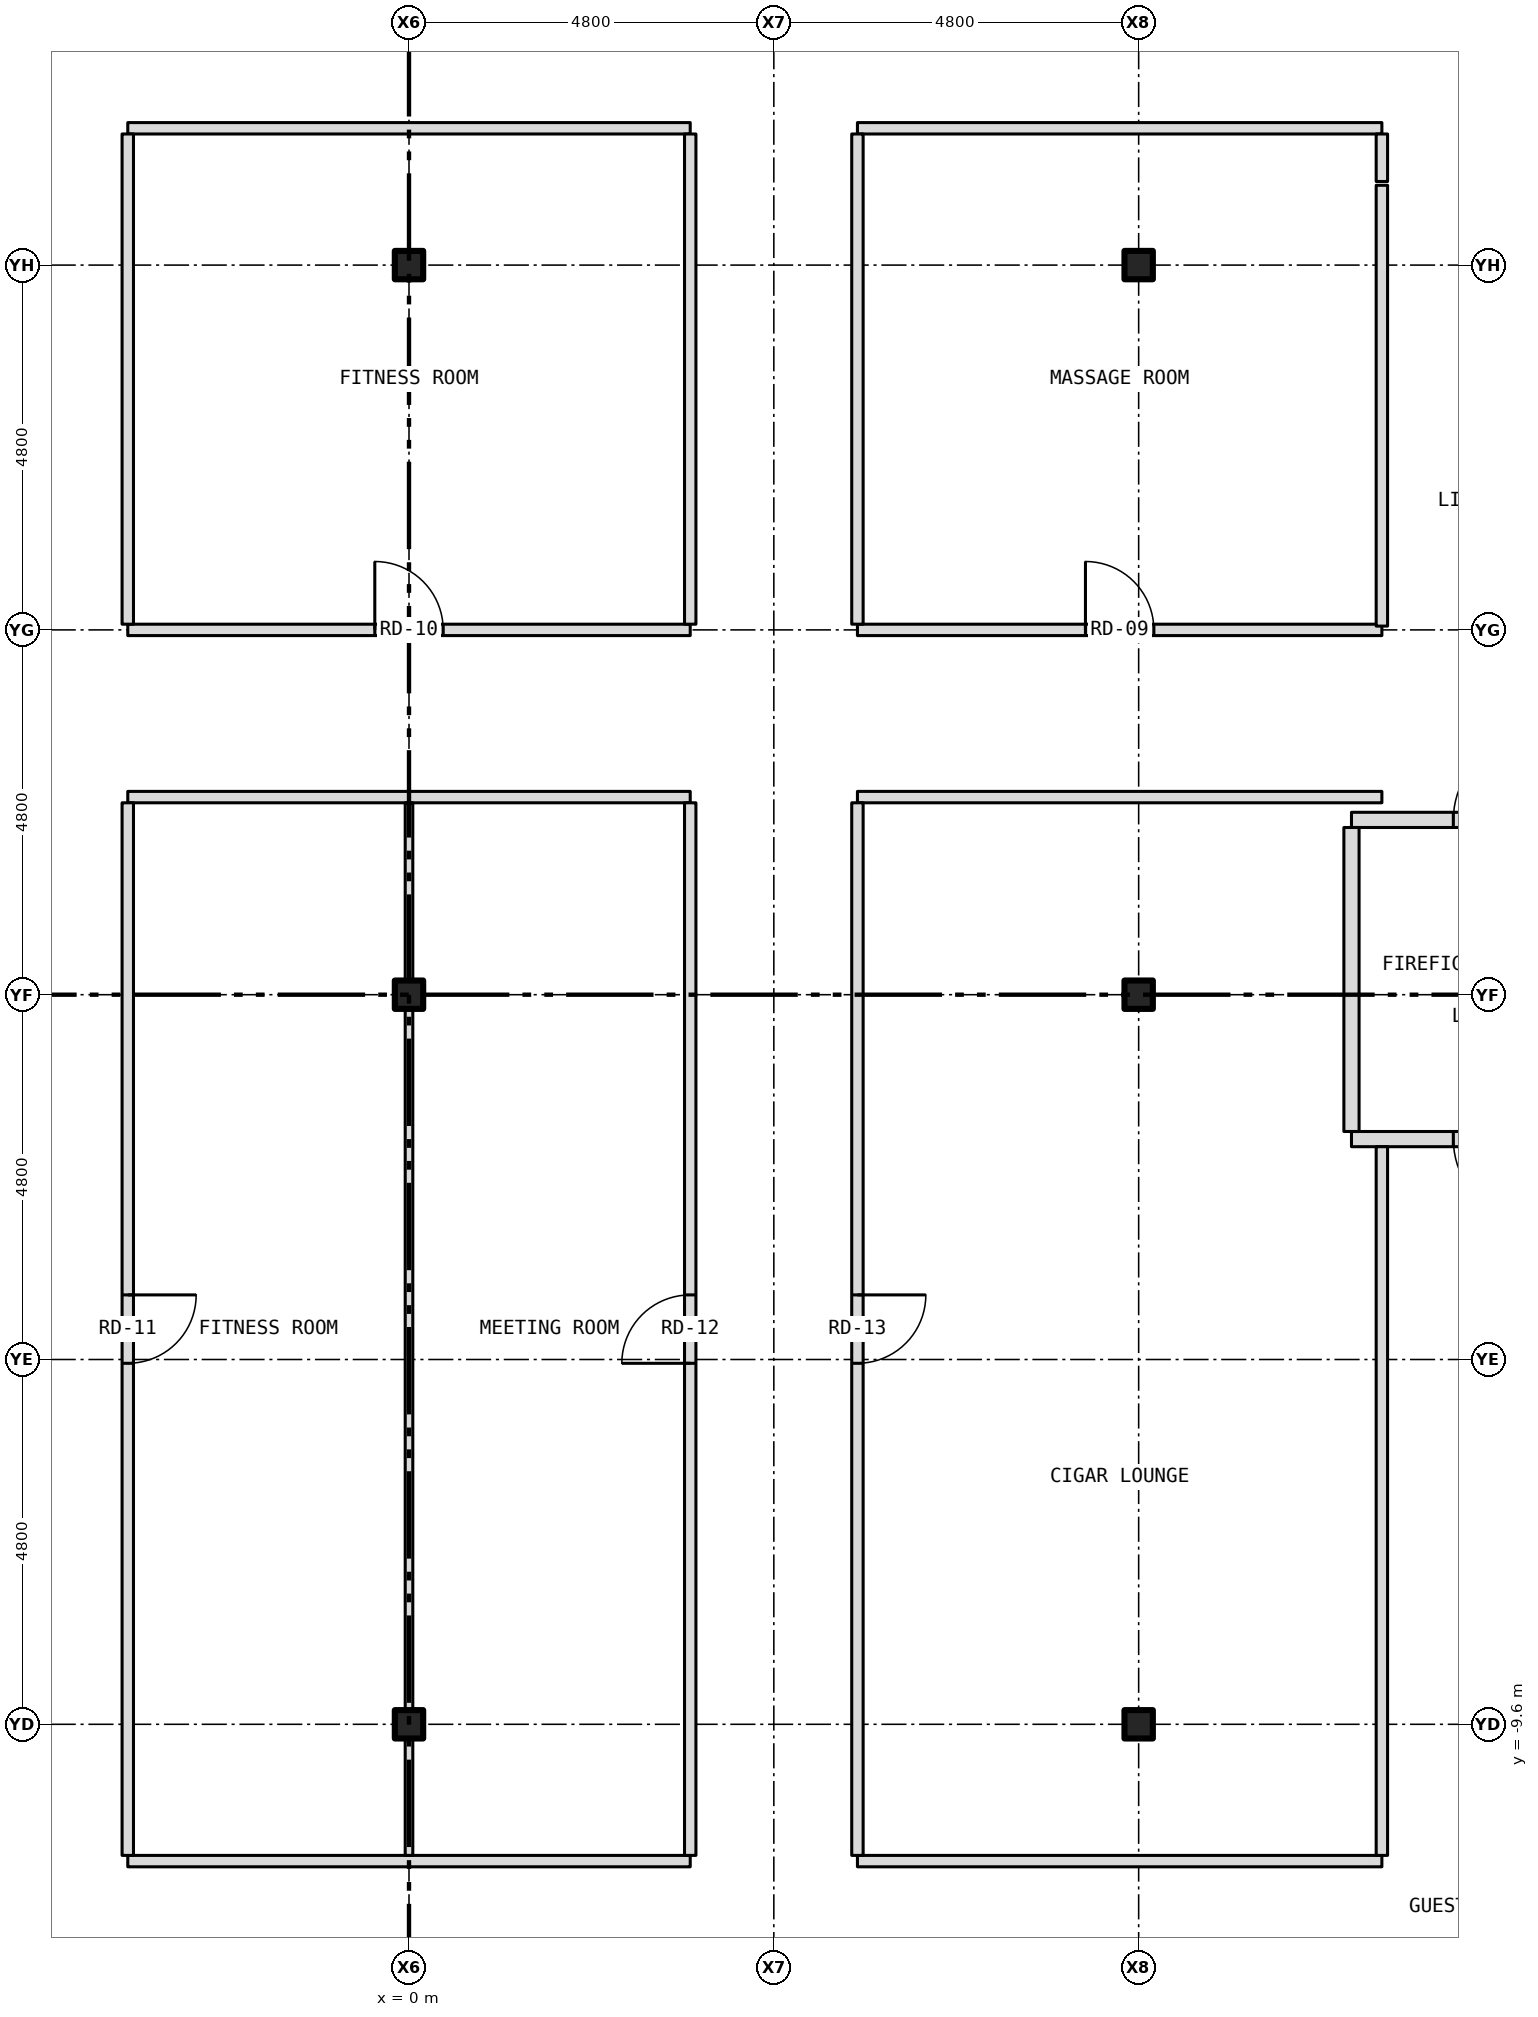
"""IFC4 building model, lengths in metres.
Left out: names, types, materials, properties, quantities, classifications, styles, units other than length and angle.
Written with IfcOpenShell. Run it as: python <this file> out.ifc"""

import sys

from ifc_helpers import new_model, si_unit, direction, frame, frame_2d, origin, origin_2d, place, context, subcontext, project, spatial, rectangle, i_section, extrude, element, fill, save


model = new_model("IFC4")
c1 = context("Model", 3, precision=1e-05, world=origin(), true_north=direction((0.0, 1.0)))
c2 = subcontext(c1, "Body", "Model", "MODEL_VIEW")
j1 = project(units=[si_unit("LENGTHUNIT", "METRE"), si_unit("PLANEANGLEUNIT", "RADIAN")], contexts=[c1])
p1 = place(None, origin())
s1 = spatial("IfcSite", under=j1, at=p1, CompositionType="ELEMENT")
p2 = place(p1, origin())
s2 = spatial("IfcBuilding", under=s1, at=p2, CompositionType="ELEMENT")
p3 = place(p2, frame((0.0, 0.0, 148.0)))
s3 = spatial("IfcBuildingStorey", under=s2, at=p3, CompositionType="ELEMENT", Elevation=148.0)
for number, where, z_axis, x_axis in (
    (1, (0.0, -9.6, -0.15), (0.0, 0.0, 1.0), (1.0, 0.0, 0.0)),
    (2, (0.0, 0.0, -0.15), (0.0, 0.0, 1.0), (1.0, 0.0, 0.0)),
    (3, (0.0, 9.6, -0.15), (0.0, 0.0, 1.0), (1.0, 0.0, 0.0)),
    (4, (9.6, -9.6, -0.15), (0.0, 0.0, 1.0), (1.0, 0.0, 0.0)),
    (5, (9.6, 0.0, -0.15), (0.0, 0.0, 1.0), (1.0, 0.0, 0.0)),
    (6, (9.6, 9.6, -0.15), (0.0, 0.0, 1.0), (1.0, 0.0, 0.0)),
):
    element("IfcColumn", number, at=place(p3, frame(where, z_axis=z_axis, x_axis=x_axis)), inside=s3, PredefinedType="COLUMN", context=c2, shape_type="SweptSolid", body=[
        extrude(i_section(OverallWidth=0.373, OverallDepth=0.373, WebThickness=0.016, FlangeThickness=0.026, at=origin_2d()), origin(), (0.0, 0.0, 1.0), 3.5),
    ])
p4 = place(p3, frame((-3.7, -11.4, 0.0), z_axis=(0.0, 0.0, 1.0), x_axis=(1.0, 0.0, 0.0)))
e7 = element("IfcWall", 7, at=p4, inside=s3, PredefinedType="PARTITIONING", context=c2, shape_type="SweptSolid", body=[
    extrude(rectangle(XDim=7.4, YDim=0.15, at=frame_2d((3.7, 0.0))), origin(), (0.0, 0.0, 1.0), 3.35),
])
p5 = place(p3, frame((5.9, -11.4, 0.0), z_axis=(0.0, 0.0, 1.0), x_axis=(1.0, 0.0, 0.0)))
e8 = element("IfcWall", 8, at=p5, inside=s3, PredefinedType="PARTITIONING", context=c2, shape_type="SweptSolid", body=[
    extrude(rectangle(XDim=6.9, YDim=0.15, at=frame_2d((3.45, 0.0))), origin(), (0.0, 0.0, 1.0), 3.35),
])
p6 = place(p3, frame((12.4, -1.9, 0.0), z_axis=(0.0, 0.0, 1.0), x_axis=(1.0, 0.0, 0.0)))
e9 = element("IfcWall", 9, at=p6, inside=s3, PredefinedType="PARTITIONING", context=c2, shape_type="SweptSolid", body=[
    extrude(rectangle(XDim=3.28, YDim=0.2, at=frame_2d((1.64, 0.0))), origin(), (0.0, 0.0, 1.0), 3.35),
])
p7 = place(p6, frame((1.34, 0.0, 0.0)))
e10 = element("IfcOpeningElement", 10, at=p7, cuts=e9, PredefinedType="OPENING", context=c2, shape_type="SweptSolid", body=[
    extrude(rectangle(XDim=1.1, YDim=2.1, at=frame_2d((0.55, 1.05))), frame((0.0, 0.112, 0.0), z_axis=(0.0, -1.0, 0.0), x_axis=(1.0, 0.0, 0.0)), (0.0, 0.0, 1.0), 0.224),
])
p8 = place(p3, frame((12.4, 2.3, 0.0), z_axis=(0.0, 0.0, 1.0), x_axis=(1.0, 0.0, 0.0)))
e11 = element("IfcWall", 11, at=p8, inside=s3, PredefinedType="PARTITIONING", context=c2, shape_type="SweptSolid", body=[
    extrude(rectangle(XDim=3.28, YDim=0.2, at=frame_2d((1.64, 0.0))), origin(), (0.0, 0.0, 1.0), 3.35),
])
p9 = place(p8, frame((1.34, 0.0, 0.0)))
e12 = element("IfcOpeningElement", 12, at=p9, cuts=e11, PredefinedType="OPENING", context=c2, shape_type="SweptSolid", body=[
    extrude(rectangle(XDim=1.1, YDim=2.1, at=frame_2d((0.55, 1.05))), frame((0.0, 0.112, 0.0), z_axis=(0.0, -1.0, 0.0), x_axis=(1.0, 0.0, 0.0)), (0.0, 0.0, 1.0), 0.224),
])
p10 = place(p3, frame((-3.7, 2.6, 0.0), z_axis=(0.0, 0.0, 1.0), x_axis=(1.0, 0.0, 0.0)))
e13 = element("IfcWall", 13, at=p10, inside=s3, PredefinedType="PARTITIONING", context=c2, shape_type="SweptSolid", body=[
    extrude(rectangle(XDim=7.4, YDim=0.15, at=frame_2d((3.7, 0.0))), origin(), (0.0, 0.0, 1.0), 3.35),
])
p11 = place(p3, frame((5.9, 2.6, 0.0), z_axis=(0.0, 0.0, 1.0), x_axis=(1.0, 0.0, 0.0)))
e14 = element("IfcWall", 14, at=p11, inside=s3, PredefinedType="PARTITIONING", context=c2, shape_type="SweptSolid", body=[
    extrude(rectangle(XDim=6.9, YDim=0.15, at=frame_2d((3.45, 0.0))), origin(), (0.0, 0.0, 1.0), 3.35),
])
p12 = place(p3, frame((-3.7, 4.8, 0.0), z_axis=(0.0, 0.0, 1.0), x_axis=(1.0, 0.0, 0.0)))
e15 = element("IfcWall", 15, at=p12, inside=s3, PredefinedType="PARTITIONING", context=c2, shape_type="SweptSolid", body=[
    extrude(rectangle(XDim=7.4, YDim=0.15, at=frame_2d((3.7, 0.0))), origin(), (0.0, 0.0, 1.0), 3.35),
])
p13 = place(p12, frame((3.25, 0.0, 0.0)))
e16 = element("IfcOpeningElement", 16, at=p13, cuts=e15, PredefinedType="OPENING", context=c2, shape_type="SweptSolid", body=[
    extrude(rectangle(XDim=0.9, YDim=2.1, at=frame_2d((0.45, 1.05))), frame((0.0, 0.087, 0.0), z_axis=(0.0, -1.0, 0.0), x_axis=(1.0, 0.0, 0.0)), (0.0, 0.0, 1.0), 0.174),
])
p14 = place(p3, frame((5.9, 4.8, 0.0), z_axis=(0.0, 0.0, 1.0), x_axis=(1.0, 0.0, 0.0)))
e17 = element("IfcWall", 17, at=p14, inside=s3, PredefinedType="PARTITIONING", context=c2, shape_type="SweptSolid", body=[
    extrude(rectangle(XDim=6.9, YDim=0.15, at=frame_2d((3.45, 0.0))), origin(), (0.0, 0.0, 1.0), 3.35),
])
p15 = place(p14, frame((3.0, 0.0, 0.0)))
e18 = element("IfcOpeningElement", 18, at=p15, cuts=e17, PredefinedType="OPENING", context=c2, shape_type="SweptSolid", body=[
    extrude(rectangle(XDim=0.9, YDim=2.1, at=frame_2d((0.45, 1.05))), frame((0.0, 0.087, 0.0), z_axis=(0.0, -1.0, 0.0), x_axis=(1.0, 0.0, 0.0)), (0.0, 0.0, 1.0), 0.174),
])
p16 = place(p3, frame((-3.7, 11.4, 0.0), z_axis=(0.0, 0.0, 1.0), x_axis=(1.0, 0.0, 0.0)))
e19 = element("IfcWall", 19, at=p16, inside=s3, PredefinedType="PARTITIONING", context=c2, shape_type="SweptSolid", body=[
    extrude(rectangle(XDim=7.4, YDim=0.15, at=frame_2d((3.7, 0.0))), origin(), (0.0, 0.0, 1.0), 3.35),
])
p17 = place(p3, frame((5.9, 11.4, 0.0), z_axis=(0.0, 0.0, 1.0), x_axis=(1.0, 0.0, 0.0)))
e20 = element("IfcWall", 20, at=p17, inside=s3, PredefinedType="PARTITIONING", context=c2, shape_type="SweptSolid", body=[
    extrude(rectangle(XDim=6.9, YDim=0.15, at=frame_2d((3.45, 0.0))), origin(), (0.0, 0.0, 1.0), 3.35),
])
p18 = place(p3, frame((-3.7, -11.325, 0.0), z_axis=(0.0, 0.0, 1.0), x_axis=(0.0, 1.0, 0.0)))
e21 = element("IfcWall", 21, at=p18, inside=s3, PredefinedType="PARTITIONING", context=c2, shape_type="SweptSolid", body=[
    extrude(rectangle(XDim=13.85, YDim=0.15, at=frame_2d((6.925, 0.0))), origin(), (0.0, 0.0, 1.0), 3.35),
])
p19 = place(p18, frame((6.475, 0.0, 0.0)))
e22 = element("IfcOpeningElement", 22, at=p19, cuts=e21, PredefinedType="OPENING", context=c2, shape_type="SweptSolid", body=[
    extrude(rectangle(XDim=0.9, YDim=2.1, at=frame_2d((0.45, 1.05))), frame((0.0, 0.087, 0.0), z_axis=(0.0, -1.0, 0.0), x_axis=(1.0, 0.0, 0.0)), (0.0, 0.0, 1.0), 0.174),
])
p20 = place(p3, frame((-3.7, 4.875, 0.0), z_axis=(0.0, 0.0, 1.0), x_axis=(0.0, 1.0, 0.0)))
e23 = element("IfcWall", 23, at=p20, inside=s3, PredefinedType="PARTITIONING", context=c2, shape_type="SweptSolid", body=[
    extrude(rectangle(XDim=6.45, YDim=0.15, at=frame_2d((3.225, 0.0))), origin(), (0.0, 0.0, 1.0), 3.35),
])
p21 = place(p3, frame((0.0, -11.325, 0.0), z_axis=(0.0, 0.0, 1.0), x_axis=(0.0, 1.0, 0.0)))
e24 = element("IfcWall", 24, at=p21, inside=s3, PredefinedType="PARTITIONING", context=c2, shape_type="SweptSolid", body=[
    extrude(rectangle(XDim=1.538, YDim=0.1, at=frame_2d((0.769, 0.0))), origin(), (0.0, 0.0, 1.0), 2.728),
])
p22 = place(p3, frame((0.0, -9.787, 0.0), z_axis=(0.0, 0.0, 1.0), x_axis=(0.0, 1.0, 0.0)))
e25 = element("IfcWall", 25, at=p22, inside=s3, PredefinedType="PARTITIONING", context=c2, shape_type="SweptSolid", body=[
    extrude(rectangle(XDim=0.374, YDim=0.1, at=frame_2d((0.187, 0.0))), origin(), (0.0, 0.0, 1.0), 3.35),
])
p23 = place(p3, frame((0.0, -9.413, 0.0), z_axis=(0.0, 0.0, 1.0), x_axis=(0.0, 1.0, 0.0)))
e26 = element("IfcWall", 26, at=p23, inside=s3, PredefinedType="PARTITIONING", context=c2, shape_type="SweptSolid", body=[
    extrude(rectangle(XDim=9.226, YDim=0.1, at=frame_2d((4.613, 0.0))), origin(), (0.0, 0.0, 1.0), 2.728),
])
p24 = place(p3, frame((0.0, -0.187, 0.0), z_axis=(0.0, 0.0, 1.0), x_axis=(0.0, 1.0, 0.0)))
e27 = element("IfcWall", 27, at=p24, inside=s3, PredefinedType="PARTITIONING", context=c2, shape_type="SweptSolid", body=[
    extrude(rectangle(XDim=0.374, YDim=0.1, at=frame_2d((0.187, 0.0))), origin(), (0.0, 0.0, 1.0), 3.35),
])
p25 = place(p3, frame((0.0, 0.187, 0.0), z_axis=(0.0, 0.0, 1.0), x_axis=(0.0, 1.0, 0.0)))
e28 = element("IfcWall", 28, at=p25, inside=s3, PredefinedType="PARTITIONING", context=c2, shape_type="SweptSolid", body=[
    extrude(rectangle(XDim=2.338, YDim=0.1, at=frame_2d((1.169, 0.0))), origin(), (0.0, 0.0, 1.0), 2.728),
])
p26 = place(p3, frame((3.7, -11.325, 0.0), z_axis=(0.0, 0.0, 1.0), x_axis=(0.0, 1.0, 0.0)))
e29 = element("IfcWall", 29, at=p26, inside=s3, PredefinedType="PARTITIONING", context=c2, shape_type="SweptSolid", body=[
    extrude(rectangle(XDim=13.85, YDim=0.15, at=frame_2d((6.925, 0.0))), origin(), (0.0, 0.0, 1.0), 3.35),
])
p27 = place(p26, frame((6.475, 0.0, 0.0)))
e30 = element("IfcOpeningElement", 30, at=p27, cuts=e29, PredefinedType="OPENING", context=c2, shape_type="SweptSolid", body=[
    extrude(rectangle(XDim=0.9, YDim=2.1, at=frame_2d((0.45, 1.05))), frame((0.0, 0.087, 0.0), z_axis=(0.0, -1.0, 0.0), x_axis=(1.0, 0.0, 0.0)), (0.0, 0.0, 1.0), 0.174),
])
p28 = place(p3, frame((3.7, 4.875, 0.0), z_axis=(0.0, 0.0, 1.0), x_axis=(0.0, 1.0, 0.0)))
e31 = element("IfcWall", 31, at=p28, inside=s3, PredefinedType="PARTITIONING", context=c2, shape_type="SweptSolid", body=[
    extrude(rectangle(XDim=6.45, YDim=0.15, at=frame_2d((3.225, 0.0))), origin(), (0.0, 0.0, 1.0), 3.35),
])
p29 = place(p3, frame((5.9, -11.325, 0.0), z_axis=(0.0, 0.0, 1.0), x_axis=(0.0, 1.0, 0.0)))
e32 = element("IfcWall", 32, at=p29, inside=s3, PredefinedType="PARTITIONING", context=c2, shape_type="SweptSolid", body=[
    extrude(rectangle(XDim=13.85, YDim=0.15, at=frame_2d((6.925, 0.0))), origin(), (0.0, 0.0, 1.0), 3.35),
])
p30 = place(p29, frame((6.475, 0.0, 0.0)))
e33 = element("IfcOpeningElement", 33, at=p30, cuts=e32, PredefinedType="OPENING", context=c2, shape_type="SweptSolid", body=[
    extrude(rectangle(XDim=0.9, YDim=2.1, at=frame_2d((0.45, 1.05))), frame((0.0, 0.087, 0.0), z_axis=(0.0, -1.0, 0.0), x_axis=(1.0, 0.0, 0.0)), (0.0, 0.0, 1.0), 0.174),
])
p31 = place(p3, frame((5.9, 4.875, 0.0), z_axis=(0.0, 0.0, 1.0), x_axis=(0.0, 1.0, 0.0)))
e34 = element("IfcWall", 34, at=p31, inside=s3, PredefinedType="PARTITIONING", context=c2, shape_type="SweptSolid", body=[
    extrude(rectangle(XDim=6.45, YDim=0.15, at=frame_2d((3.225, 0.0))), origin(), (0.0, 0.0, 1.0), 3.35),
])
p32 = place(p3, frame((12.4, -1.8, 0.0), z_axis=(0.0, 0.0, 1.0), x_axis=(0.0, 1.0, 0.0)))
e35 = element("IfcWall", 35, at=p32, inside=s3, PredefinedType="PARTITIONING", context=c2, shape_type="SweptSolid", body=[
    extrude(rectangle(XDim=4.0, YDim=0.2, at=frame_2d((2.0, 0.0))), origin(), (0.0, 0.0, 1.0), 3.35),
])
p33 = place(p3, frame((12.8, -11.325, 0.0), z_axis=(0.0, 0.0, 1.0), x_axis=(0.0, 1.0, 0.0)))
e36 = element("IfcWall", 36, at=p33, inside=s3, PredefinedType="PARTITIONING", context=c2, shape_type="SweptSolid", body=[
    extrude(rectangle(XDim=9.325, YDim=0.15, at=frame_2d((4.663, 0.0))), origin(), (0.0, 0.0, 1.0), 3.35),
])
p34 = place(p3, frame((12.8, 4.85, 0.0), z_axis=(0.0, 0.0, 1.0), x_axis=(0.0, 1.0, 0.0)))
e37 = element("IfcWall", 37, at=p34, inside=s3, PredefinedType="PARTITIONING", context=c2, shape_type="SweptSolid", body=[
    extrude(rectangle(XDim=5.8, YDim=0.15, at=frame_2d((2.9, 0.0))), origin(), (0.0, 0.0, 1.0), 3.35),
])
p35 = place(p3, frame((12.8, 10.7, 0.0), z_axis=(0.0, 0.0, 1.0), x_axis=(0.0, 1.0, 0.0)))
e38 = element("IfcWall", 38, at=p35, inside=s3, PredefinedType="PARTITIONING", context=c2, shape_type="SweptSolid", body=[
    extrude(rectangle(XDim=0.625, YDim=0.15, at=frame_2d((0.312, 0.0))), origin(), (0.0, 0.0, 1.0), 3.35),
])
p36 = place(p9, origin())
e39 = element("IfcDoor", 39, at=p36, inside=s3, OperationType="SINGLE_SWING_RIGHT", PredefinedType="DOOR", context=c2, shape_type="SweptSolid", body=[
    extrude(rectangle(XDim=1.1, YDim=2.1, at=frame_2d((0.55, 1.05))), frame((0.0, 0.025, 0.0), z_axis=(0.0, -1.0, 0.0), x_axis=(1.0, 0.0, 0.0)), (0.0, 0.0, 1.0), 0.05),
])
fill(e12, e39)
p37 = place(p7, origin())
e40 = element("IfcDoor", 40, at=p37, inside=s3, OperationType="SINGLE_SWING_RIGHT", PredefinedType="DOOR", context=c2, shape_type="SweptSolid", body=[
    extrude(rectangle(XDim=1.1, YDim=2.1, at=frame_2d((0.55, 1.05))), frame((0.0, 0.025, 0.0), z_axis=(0.0, -1.0, 0.0), x_axis=(1.0, 0.0, 0.0)), (0.0, 0.0, 1.0), 0.05),
])
fill(e10, e40)
p38 = place(p15, origin())
e41 = element("IfcDoor", 41, at=p38, inside=s3, OperationType="SINGLE_SWING_LEFT", PredefinedType="DOOR", context=c2, shape_type="SweptSolid", body=[
    extrude(rectangle(XDim=0.9, YDim=2.1, at=frame_2d((0.45, 1.05))), frame((0.0, 0.025, 0.0), z_axis=(0.0, -1.0, 0.0), x_axis=(1.0, 0.0, 0.0)), (0.0, 0.0, 1.0), 0.05),
])
fill(e18, e41)
p39 = place(p13, origin())
e42 = element("IfcDoor", 42, at=p39, inside=s3, OperationType="SINGLE_SWING_LEFT", PredefinedType="DOOR", context=c2, shape_type="SweptSolid", body=[
    extrude(rectangle(XDim=0.9, YDim=2.1, at=frame_2d((0.45, 1.05))), frame((0.0, 0.025, 0.0), z_axis=(0.0, -1.0, 0.0), x_axis=(1.0, 0.0, 0.0)), (0.0, 0.0, 1.0), 0.05),
])
fill(e16, e42)
p40 = place(p19, origin())
e43 = element("IfcDoor", 43, at=p40, inside=s3, OperationType="SINGLE_SWING_RIGHT", PredefinedType="DOOR", context=c2, shape_type="SweptSolid", body=[
    extrude(rectangle(XDim=0.9, YDim=2.1, at=frame_2d((0.45, 1.05))), frame((0.0, 0.025, 0.0), z_axis=(0.0, -1.0, 0.0), x_axis=(1.0, 0.0, 0.0)), (0.0, 0.0, 1.0), 0.05),
])
fill(e22, e43)
p41 = place(p27, origin())
e44 = element("IfcDoor", 44, at=p41, inside=s3, OperationType="SINGLE_SWING_LEFT", PredefinedType="DOOR", context=c2, shape_type="SweptSolid", body=[
    extrude(rectangle(XDim=0.9, YDim=2.1, at=frame_2d((0.45, 1.05))), frame((0.0, 0.025, 0.0), z_axis=(0.0, -1.0, 0.0), x_axis=(1.0, 0.0, 0.0)), (0.0, 0.0, 1.0), 0.05),
])
fill(e30, e44)
p42 = place(p30, origin())
e45 = element("IfcDoor", 45, at=p42, inside=s3, OperationType="SINGLE_SWING_RIGHT", PredefinedType="DOOR", context=c2, shape_type="SweptSolid", body=[
    extrude(rectangle(XDim=0.9, YDim=2.1, at=frame_2d((0.45, 1.05))), frame((0.0, 0.025, 0.0), z_axis=(0.0, -1.0, 0.0), x_axis=(1.0, 0.0, 0.0)), (0.0, 0.0, 1.0), 0.05),
])
fill(e33, e45)
save(model, sys.argv[1])
